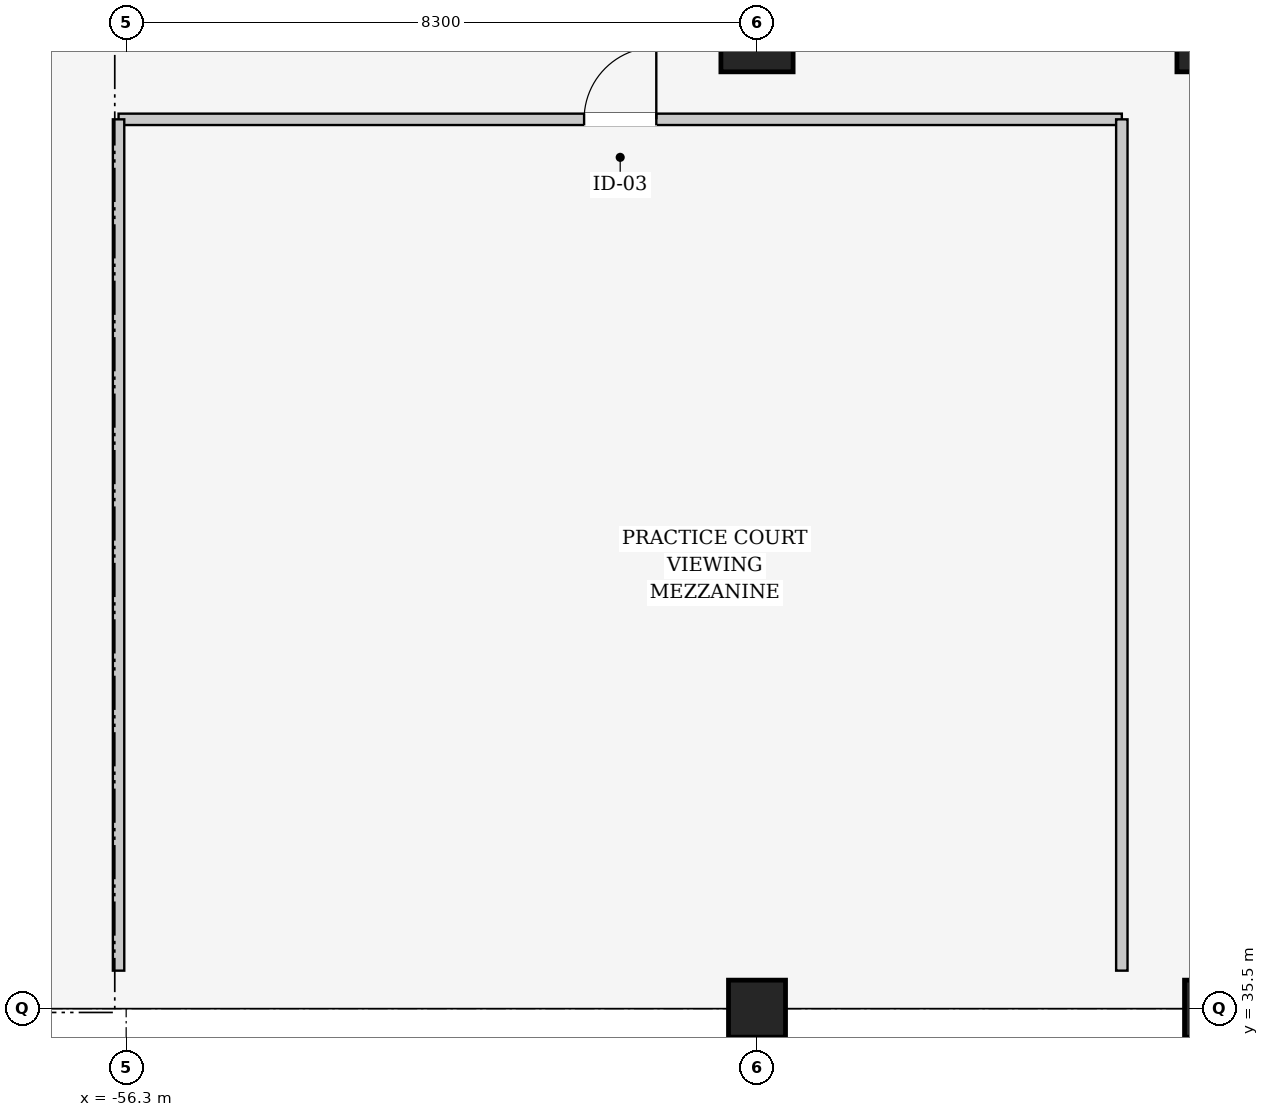
"""IFC4 building model, lengths in metres.
Left out: names, types, materials, properties, quantities, classifications, styles, units other than length and angle.
Written with IfcOpenShell. Run it as: python <this file> out.ifc"""

import sys

from ifc_helpers import new_model, si_unit, direction, frame, frame_2d, origin, origin_2d, place, context, subcontext, project, spatial, rectangle, extrude, element, fill, save


model = new_model("IFC4")
c1 = context("Model", 3, precision=1e-05, world=origin(), true_north=direction((0.0, 1.0)))
c2 = subcontext(c1, "Body", "Model", "MODEL_VIEW")
j1 = project(units=[si_unit("LENGTHUNIT", "METRE"), si_unit("PLANEANGLEUNIT", "RADIAN")], contexts=[c1])
p1 = place(None, origin())
s1 = spatial("IfcSite", under=j1, at=p1, CompositionType="ELEMENT")
p2 = place(p1, origin())
s2 = spatial("IfcBuilding", under=s1, at=p2, CompositionType="ELEMENT")
p3 = place(p2, frame((0.0, 0.0, 6.0)))
s3 = spatial("IfcBuildingStorey", under=s2, at=p3, CompositionType="ELEMENT", Elevation=6.0)
p4 = place(p3, frame((-48.0, 35.5, 0.0), z_axis=(0.0, 0.0, 1.0), x_axis=(1.0, 0.0, 0.0)))
e1 = element("IfcColumn", 1, at=p4, inside=s3, PredefinedType="COLUMN", context=c2, shape_type="SweptSolid", body=[
    extrude(rectangle(XDim=0.75, YDim=0.75, at=origin_2d()), origin(), (0.0, 0.0, 1.0), 5.4),
])
p5 = place(p3, frame((-48.0, 48.3, 0.0), z_axis=(0.0, 0.0, 1.0), x_axis=(1.0, 0.0, 0.0)))
e2 = element("IfcColumn", 2, at=p5, inside=s3, PredefinedType="COLUMN", context=c2, shape_type="SweptSolid", body=[
    extrude(rectangle(XDim=0.95, YDim=0.95, at=origin_2d()), origin(), (0.0, 0.0, 1.0), 5.4),
])
p6 = place(p3, frame((-42.0, 35.5, 0.0), z_axis=(0.0, 0.0, 1.0), x_axis=(1.0, 0.0, 0.0)))
e3 = element("IfcColumn", 3, at=p6, inside=s3, PredefinedType="COLUMN", context=c2, shape_type="SweptSolid", body=[
    extrude(rectangle(XDim=0.75, YDim=0.75, at=origin_2d()), origin(), (0.0, 0.0, 1.0), 5.4),
])
p7 = place(p3, frame((-42.0, 48.3, 0.0), z_axis=(0.0, 0.0, 1.0), x_axis=(1.0, 0.0, 0.0)))
e4 = element("IfcColumn", 4, at=p7, inside=s3, PredefinedType="COLUMN", context=c2, shape_type="SweptSolid", body=[
    extrude(rectangle(XDim=0.95, YDim=0.95, at=origin_2d()), origin(), (0.0, 0.0, 1.0), 5.4),
])
p8 = place(p3, frame((-56.4, 47.2, 0.0), z_axis=(0.0, 0.0, 1.0), x_axis=(1.0, 0.0, 0.0)))
e5 = element("IfcWall", 5, at=p8, inside=s3, PredefinedType="PARTITIONING", context=c2, shape_type="SweptSolid", body=[
    extrude(rectangle(XDim=13.2, YDim=0.15, at=frame_2d((6.6, 0.0))), origin(), (0.0, 0.0, 1.0), 4.522),
])
p9 = place(p8, frame((6.125, 0.0, 0.0)))
e6 = element("IfcOpeningElement", 6, at=p9, cuts=e5, PredefinedType="OPENING", context=c2, shape_type="SweptSolid", body=[
    extrude(rectangle(XDim=0.95, YDim=2.15, at=frame_2d((0.475, 1.075))), frame((0.0, 0.085, 0.0), z_axis=(0.0, -1.0, 0.0), x_axis=(1.0, 0.0, 0.0)), (0.0, 0.0, 1.0), 0.17),
])
p10 = place(p3, frame((-43.2, 47.2, 0.0), z_axis=(0.0, 0.0, 1.0), x_axis=(0.0, -1.0, 0.0)))
e7 = element("IfcWall", 7, at=p10, inside=s3, PredefinedType="PARTITIONING", context=c2, shape_type="SweptSolid", body=[
    extrude(rectangle(XDim=11.2, YDim=0.15, at=frame_2d((5.6, 0.0))), origin(), (0.0, 0.0, 1.0), 4.7),
])
p11 = place(p3, frame((-56.4, 36.0, 0.0), z_axis=(0.0, 0.0, 1.0), x_axis=(0.0, 1.0, 0.0)))
e8 = element("IfcWall", 8, at=p11, inside=s3, PredefinedType="PARTITIONING", context=c2, shape_type="SweptSolid", body=[
    extrude(rectangle(XDim=11.2, YDim=0.15, at=frame_2d((5.6, 0.0))), origin(), (0.0, 0.0, 1.0), 4.105),
])
p12 = place(p9, origin())
e9 = element("IfcDoor", 9, at=p12, inside=s3, OperationType="SINGLE_SWING_RIGHT", PredefinedType="DOOR", context=c2, shape_type="SweptSolid", body=[
    extrude(rectangle(XDim=0.95, YDim=2.15, at=frame_2d((0.475, 1.075))), frame((0.0, 0.025, 0.0), z_axis=(0.0, -1.0, 0.0), x_axis=(1.0, 0.0, 0.0)), (0.0, 0.0, 1.0), 0.05),
])
fill(e6, e9)
save(model, sys.argv[1])
